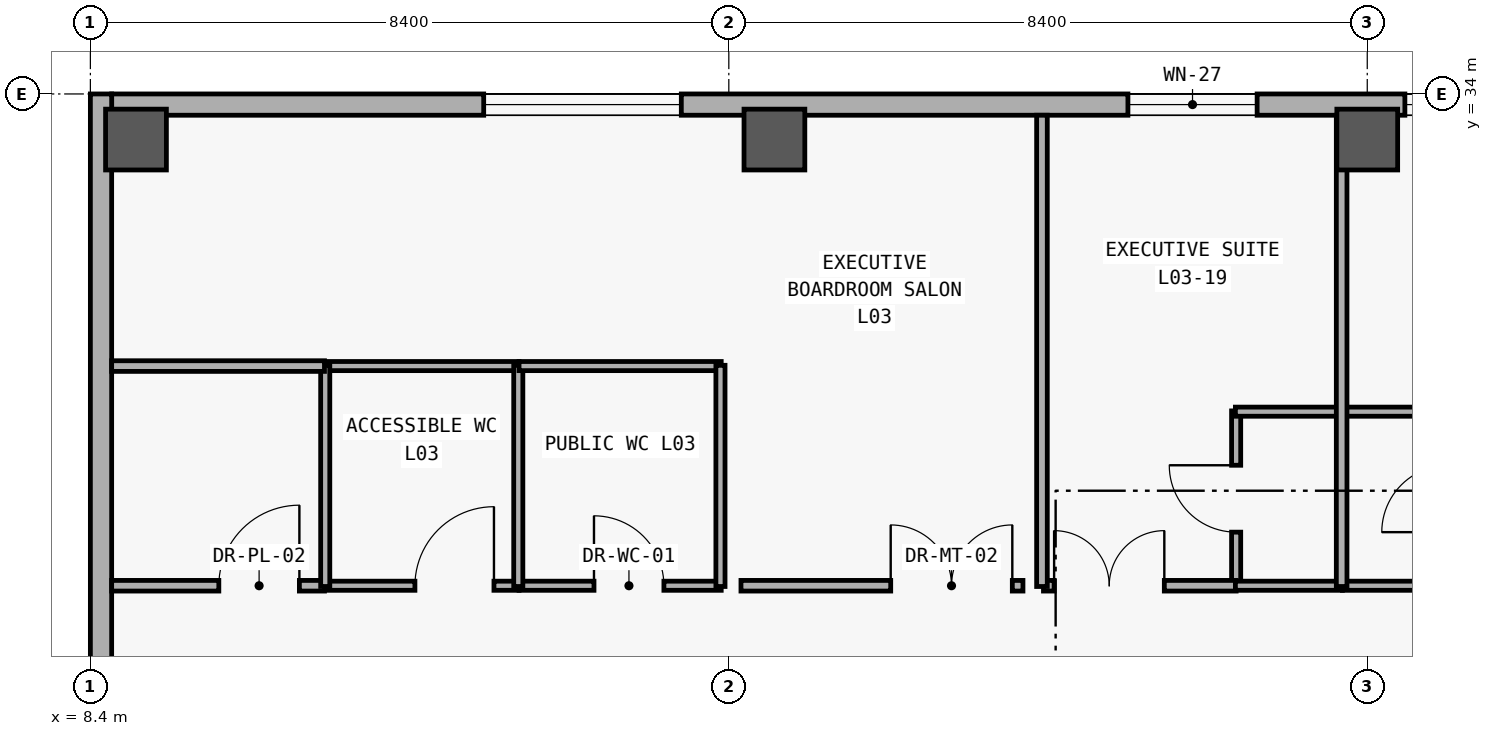
"""IFC4 building model, lengths in metres.
Left out: names, types, materials, properties, quantities, classifications, styles, units other than length and angle.
Written with IfcOpenShell. Run it as: python <this file> out.ifc"""

import sys

from ifc_helpers import new_model, si_unit, direction, frame, frame_2d, origin, origin_2d, place, context, subcontext, project, spatial, rectangle, extrude, element, fill, save


model = new_model("IFC4")
c1 = context("Model", 3, precision=1e-05, world=origin(), true_north=direction((0.0, 1.0)))
c2 = subcontext(c1, "Body", "Model", "MODEL_VIEW")
j1 = project(units=[si_unit("LENGTHUNIT", "METRE"), si_unit("PLANEANGLEUNIT", "RADIAN")], contexts=[c1])
p1 = place(None, origin())
s1 = spatial("IfcSite", under=j1, at=p1, CompositionType="ELEMENT")
p2 = place(p1, origin())
s2 = spatial("IfcBuilding", under=s1, at=p2, CompositionType="ELEMENT")
p3 = place(p2, frame((0.0, 0.0, 15.0)))
s3 = spatial("IfcBuildingStorey", under=s2, at=p3, CompositionType="ELEMENT", Elevation=15.0)
for number, where, z_axis, x_axis in (
    (1, (9.0, 33.4, 0.0), (0.0, 0.0, 1.0), (1.0, 0.0, 0.0)),
    (2, (17.4, 33.4, 0.0), (0.0, 0.0, 1.0), (1.0, 0.0, 0.0)),
    (3, (25.2, 33.4, 0.0), (0.0, 0.0, 1.0), (1.0, 0.0, 0.0)),
):
    element("IfcColumn", number, at=place(p3, frame(where, z_axis=z_axis, x_axis=x_axis)), inside=s3, PredefinedType="COLUMN", context=c2, shape_type="SweptSolid", body=[
        extrude(rectangle(XDim=0.8, YDim=0.8, at=origin_2d()), origin(), (0.0, 0.0, 1.0), 4.2),
    ])
p4 = place(p3, frame((8.68, 33.86, 0.0), z_axis=(0.0, 0.0, 1.0), x_axis=(1.0, 0.0, 0.0)))
e4 = element("IfcWall", 4, at=p4, inside=s3, PredefinedType="SOLIDWALL", context=c2, shape_type="SweptSolid", body=[
    extrude(rectangle(XDim=83.44, YDim=0.28, at=frame_2d((41.72, 0.0))), origin(), (0.0, 0.0, 1.0), 3.92),
])
p5 = place(p4, frame((4.895, 0.0, 0.85)))
e5 = element("IfcOpeningElement", 5, at=p5, cuts=e4, PredefinedType="OPENING", context=c2, shape_type="SweptSolid", body=[
    extrude(rectangle(XDim=2.6, YDim=2.2, at=frame_2d((1.3, 1.1))), frame((0.0, 0.15, 0.0), z_axis=(0.0, -1.0, 0.0), x_axis=(1.0, 0.0, 0.0)), (0.0, 0.0, 1.0), 0.3),
])
p6 = place(p4, frame((13.371, 0.0, 0.85)))
e6 = element("IfcOpeningElement", 6, at=p6, cuts=e4, PredefinedType="OPENING", context=c2, shape_type="SweptSolid", body=[
    extrude(rectangle(XDim=1.7, YDim=2.0, at=frame_2d((0.85, 1.0))), frame((0.0, 0.15, 0.0), z_axis=(0.0, -1.0, 0.0), x_axis=(1.0, 0.0, 0.0)), (0.0, 0.0, 1.0), 0.3),
])
p7 = place(p4, frame((17.015, 0.0, 0.85)))
e7 = element("IfcOpeningElement", 7, at=p7, cuts=e4, PredefinedType="OPENING", context=c2, shape_type="SweptSolid", body=[
    extrude(rectangle(XDim=2.3, YDim=2.05, at=frame_2d((1.15, 1.025))), frame((0.0, 0.15, 0.0), z_axis=(0.0, -1.0, 0.0), x_axis=(1.0, 0.0, 0.0)), (0.0, 0.0, 1.0), 0.3),
])
p8 = place(p4, frame((20.732, 0.0, 0.85)))
e8 = element("IfcOpeningElement", 8, at=p8, cuts=e4, PredefinedType="OPENING", context=c2, shape_type="SweptSolid", body=[
    extrude(rectangle(XDim=2.75, YDim=2.1, at=frame_2d((1.375, 1.05))), frame((0.0, 0.15, 0.0), z_axis=(0.0, -1.0, 0.0), x_axis=(1.0, 0.0, 0.0)), (0.0, 0.0, 1.0), 0.3),
])
p9 = place(p4, frame((25.46, 0.0, 0.85)))
e9 = element("IfcOpeningElement", 9, at=p9, cuts=e4, PredefinedType="OPENING", context=c2, shape_type="SweptSolid", body=[
    extrude(rectangle(XDim=1.18, YDim=1.5, at=frame_2d((0.59, 0.75))), frame((0.0, 0.15, 0.0), z_axis=(0.0, -1.0, 0.0), x_axis=(1.0, 0.0, 0.0)), (0.0, 0.0, 1.0), 0.3),
])
p10 = place(p4, frame((29.352, 0.0, 0.85)))
e10 = element("IfcOpeningElement", 10, at=p10, cuts=e4, PredefinedType="OPENING", context=c2, shape_type="SweptSolid", body=[
    extrude(rectangle(XDim=1.28, YDim=1.6, at=frame_2d((0.64, 0.8))), frame((0.0, 0.15, 0.0), z_axis=(0.0, -1.0, 0.0), x_axis=(1.0, 0.0, 0.0)), (0.0, 0.0, 1.0), 0.3),
])
p11 = place(p4, frame((33.245, 0.0, 0.85)))
e11 = element("IfcOpeningElement", 11, at=p11, cuts=e4, PredefinedType="OPENING", context=c2, shape_type="SweptSolid", body=[
    extrude(rectangle(XDim=1.38, YDim=1.7, at=frame_2d((0.69, 0.85))), frame((0.0, 0.15, 0.0), z_axis=(0.0, -1.0, 0.0), x_axis=(1.0, 0.0, 0.0)), (0.0, 0.0, 1.0), 0.3),
])
p12 = place(p4, frame((37.138, 0.0, 0.85)))
e12 = element("IfcOpeningElement", 12, at=p12, cuts=e4, PredefinedType="OPENING", context=c2, shape_type="SweptSolid", body=[
    extrude(rectangle(XDim=1.48, YDim=1.8, at=frame_2d((0.74, 0.9))), frame((0.0, 0.15, 0.0), z_axis=(0.0, -1.0, 0.0), x_axis=(1.0, 0.0, 0.0)), (0.0, 0.0, 1.0), 0.3),
])
p13 = place(p4, frame((41.031, 0.0, 0.85)))
e13 = element("IfcOpeningElement", 13, at=p13, cuts=e4, PredefinedType="OPENING", context=c2, shape_type="SweptSolid", body=[
    extrude(rectangle(XDim=1.58, YDim=1.85, at=frame_2d((0.79, 0.925))), frame((0.0, 0.15, 0.0), z_axis=(0.0, -1.0, 0.0), x_axis=(1.0, 0.0, 0.0)), (0.0, 0.0, 1.0), 0.3),
])
p14 = place(p4, frame((44.923, 0.0, 0.85)))
e14 = element("IfcOpeningElement", 14, at=p14, cuts=e4, PredefinedType="OPENING", context=c2, shape_type="SweptSolid", body=[
    extrude(rectangle(XDim=1.68, YDim=1.9, at=frame_2d((0.84, 0.95))), frame((0.0, 0.15, 0.0), z_axis=(0.0, -1.0, 0.0), x_axis=(1.0, 0.0, 0.0)), (0.0, 0.0, 1.0), 0.3),
])
p15 = place(p4, frame((48.816, 0.0, 0.85)))
e15 = element("IfcOpeningElement", 15, at=p15, cuts=e4, PredefinedType="OPENING", context=c2, shape_type="SweptSolid", body=[
    extrude(rectangle(XDim=1.78, YDim=1.95, at=frame_2d((0.89, 0.975))), frame((0.0, 0.15, 0.0), z_axis=(0.0, -1.0, 0.0), x_axis=(1.0, 0.0, 0.0)), (0.0, 0.0, 1.0), 0.3),
])
p16 = place(p4, frame((52.71, 0.0, 0.85)))
e16 = element("IfcOpeningElement", 16, at=p16, cuts=e4, PredefinedType="OPENING", context=c2, shape_type="SweptSolid", body=[
    extrude(rectangle(XDim=1.88, YDim=1.95, at=frame_2d((0.94, 0.975))), frame((0.0, 0.15, 0.0), z_axis=(0.0, -1.0, 0.0), x_axis=(1.0, 0.0, 0.0)), (0.0, 0.0, 1.0), 0.3),
])
p17 = place(p4, frame((56.567, 0.0, 0.85)))
e17 = element("IfcOpeningElement", 17, at=p17, cuts=e4, PredefinedType="OPENING", context=c2, shape_type="SweptSolid", body=[
    extrude(rectangle(XDim=2.05, YDim=1.95, at=frame_2d((1.025, 0.975))), frame((0.0, 0.15, 0.0), z_axis=(0.0, -1.0, 0.0), x_axis=(1.0, 0.0, 0.0)), (0.0, 0.0, 1.0), 0.3),
])
p18 = place(p4, frame((60.444, 0.0, 0.85)))
e18 = element("IfcOpeningElement", 18, at=p18, cuts=e4, PredefinedType="OPENING", context=c2, shape_type="SweptSolid", body=[
    extrude(rectangle(XDim=2.18, YDim=1.95, at=frame_2d((1.09, 0.975))), frame((0.0, 0.15, 0.0), z_axis=(0.0, -1.0, 0.0), x_axis=(1.0, 0.0, 0.0)), (0.0, 0.0, 1.0), 0.3),
])
p19 = place(p4, frame((64.287, 0.0, 0.85)))
e19 = element("IfcOpeningElement", 19, at=p19, cuts=e4, PredefinedType="OPENING", context=c2, shape_type="SweptSolid", body=[
    extrude(rectangle(XDim=2.38, YDim=1.95, at=frame_2d((1.19, 0.975))), frame((0.0, 0.15, 0.0), z_axis=(0.0, -1.0, 0.0), x_axis=(1.0, 0.0, 0.0)), (0.0, 0.0, 1.0), 0.3),
])
p20 = place(p4, frame((68.181, 0.0, 0.85)))
e20 = element("IfcOpeningElement", 20, at=p20, cuts=e4, PredefinedType="OPENING", context=c2, shape_type="SweptSolid", body=[
    extrude(rectangle(XDim=2.48, YDim=2.0, at=frame_2d((1.24, 1.0))), frame((0.0, 0.15, 0.0), z_axis=(0.0, -1.0, 0.0), x_axis=(1.0, 0.0, 0.0)), (0.0, 0.0, 1.0), 0.3),
])
p21 = place(p4, frame((72.038, 0.0, 0.85)))
e21 = element("IfcOpeningElement", 21, at=p21, cuts=e4, PredefinedType="OPENING", context=c2, shape_type="SweptSolid", body=[
    extrude(rectangle(XDim=2.65, YDim=2.0, at=frame_2d((1.325, 1.0))), frame((0.0, 0.15, 0.0), z_axis=(0.0, -1.0, 0.0), x_axis=(1.0, 0.0, 0.0)), (0.0, 0.0, 1.0), 0.3),
])
p22 = place(p4, frame((75.831, 0.0, 0.85)))
e22 = element("IfcOpeningElement", 22, at=p22, cuts=e4, PredefinedType="OPENING", context=c2, shape_type="SweptSolid", body=[
    extrude(rectangle(XDim=2.95, YDim=2.05, at=frame_2d((1.475, 1.025))), frame((0.0, 0.15, 0.0), z_axis=(0.0, -1.0, 0.0), x_axis=(1.0, 0.0, 0.0)), (0.0, 0.0, 1.0), 0.3),
])
p23 = place(p4, frame((80.349, 0.0, 0.85)))
e23 = element("IfcOpeningElement", 23, at=p23, cuts=e4, PredefinedType="OPENING", context=c2, shape_type="SweptSolid", body=[
    extrude(rectangle(XDim=1.8, YDim=1.8, at=frame_2d((0.9, 0.9))), frame((0.0, 0.15, 0.0), z_axis=(0.0, -1.0, 0.0), x_axis=(1.0, 0.0, 0.0)), (0.0, 0.0, 1.0), 0.3),
])
p24 = place(p3, frame((8.54, 6.0, 0.0), z_axis=(0.0, 0.0, 1.0), x_axis=(0.0, 1.0, 0.0)))
e24 = element("IfcWall", 24, at=p24, inside=s3, PredefinedType="SOLIDWALL", context=c2, shape_type="SweptSolid", body=[
    extrude(rectangle(XDim=28.0, YDim=0.28, at=frame_2d((14.0, 0.0))), origin(), (0.0, 0.0, 1.0), 3.92),
])
p25 = place(p24, frame((4.5, 0.0, 0.95)))
e25 = element("IfcOpeningElement", 25, at=p25, cuts=e24, PredefinedType="OPENING", context=c2, shape_type="SweptSolid", body=[
    extrude(rectangle(XDim=1.6, YDim=1.6, at=frame_2d((0.8, 0.8))), frame((0.0, 0.15, 0.0), z_axis=(0.0, -1.0, 0.0), x_axis=(1.0, 0.0, 0.0)), (0.0, 0.0, 1.0), 0.3),
])
p26 = place(p3, frame((23.475, 27.52, 0.0), z_axis=(0.0, 0.0, 1.0), x_axis=(0.0, 1.0, 0.0)))
e26 = element("IfcWall", 26, at=p26, inside=s3, PredefinedType="PARTITIONING", context=c2, shape_type="SweptSolid", body=[
    extrude(rectangle(XDim=2.31, YDim=0.12, at=frame_2d((1.155, 0.0))), origin(), (0.0, 0.0, 1.0), 3.02),
])
p27 = place(p26, frame((0.715, 0.0, 0.0)))
e27 = element("IfcOpeningElement", 27, at=p27, cuts=e26, PredefinedType="OPENING", context=c2, shape_type="SweptSolid", body=[
    extrude(rectangle(XDim=0.88, YDim=2.15, at=frame_2d((0.44, 1.075))), frame((0.0, 0.07, 0.0), z_axis=(0.0, -1.0, 0.0), x_axis=(1.0, 0.0, 0.0)), (0.0, 0.0, 1.0), 0.14),
])
p28 = place(p3, frame((11.48, 27.53, 0.0), z_axis=(0.0, 0.0, 1.0), x_axis=(1.0, 0.0, 0.0)))
e28 = element("IfcWall", 28, at=p28, inside=s3, PredefinedType="PARTITIONING", context=c2, shape_type="SweptSolid", body=[
    extrude(rectangle(XDim=2.56, YDim=0.12, at=frame_2d((1.28, 0.0))), origin(), (0.0, 0.0, 1.0), 3.02),
])
p29 = place(p28, frame((1.19, 0.0, 0.0)))
e29 = element("IfcOpeningElement", 29, at=p29, cuts=e28, PredefinedType="OPENING", context=c2, shape_type="SweptSolid", body=[
    extrude(rectangle(XDim=1.04, YDim=2.15, at=frame_2d((0.52, 1.075))), frame((0.0, 0.07, 0.0), z_axis=(0.0, -1.0, 0.0), x_axis=(1.0, 0.0, 0.0)), (0.0, 0.0, 1.0), 0.14),
])
p30 = place(p3, frame((14.04, 27.53, 0.0), z_axis=(0.0, 0.0, 1.0), x_axis=(1.0, 0.0, 0.0)))
e30 = element("IfcWall", 30, at=p30, inside=s3, PredefinedType="PARTITIONING", context=c2, shape_type="SweptSolid", body=[
    extrude(rectangle(XDim=2.66, YDim=0.12, at=frame_2d((1.33, 0.0))), origin(), (0.0, 0.0, 1.0), 3.02),
])
p31 = place(p30, frame((0.986, 0.0, 0.0)))
e31 = element("IfcOpeningElement", 31, at=p31, cuts=e30, PredefinedType="OPENING", context=c2, shape_type="SweptSolid", body=[
    extrude(rectangle(XDim=0.92, YDim=2.15, at=frame_2d((0.46, 1.075))), frame((0.0, 0.07, 0.0), z_axis=(0.0, -1.0, 0.0), x_axis=(1.0, 0.0, 0.0)), (0.0, 0.0, 1.0), 0.14),
])
p32 = place(p3, frame((8.68, 27.53, 0.0), z_axis=(0.0, 0.0, 1.0), x_axis=(1.0, 0.0, 0.0)))
e32 = element("IfcWall", 32, at=p32, inside=s3, PredefinedType="PARTITIONING", context=c2, shape_type="SweptSolid", body=[
    extrude(rectangle(XDim=2.8, YDim=0.14, at=frame_2d((1.4, 0.0))), origin(), (0.0, 0.0, 1.0), 3.02),
])
p33 = place(p32, frame((1.41, 0.0, 0.0)))
e33 = element("IfcOpeningElement", 33, at=p33, cuts=e32, PredefinedType="OPENING", context=c2, shape_type="SweptSolid", body=[
    extrude(rectangle(XDim=1.06, YDim=2.2, at=frame_2d((0.53, 1.1))), frame((0.0, 0.08, 0.0), z_axis=(0.0, -1.0, 0.0), x_axis=(1.0, 0.0, 0.0)), (0.0, 0.0, 1.0), 0.16),
])
p34 = place(p3, frame((16.96, 27.53, 0.0), z_axis=(0.0, 0.0, 1.0), x_axis=(1.0, 0.0, 0.0)))
e34 = element("IfcWall", 34, at=p34, inside=s3, PredefinedType="PARTITIONING", context=c2, shape_type="SweptSolid", body=[
    extrude(rectangle(XDim=3.71, YDim=0.14, at=frame_2d((1.855, 0.0))), origin(), (0.0, 0.0, 1.0), 3.02),
])
p35 = place(p34, frame((1.97, 0.0, 0.0)))
e35 = element("IfcOpeningElement", 35, at=p35, cuts=e34, PredefinedType="OPENING", context=c2, shape_type="SweptSolid", body=[
    extrude(rectangle(XDim=1.6, YDim=2.3, at=frame_2d((0.8, 1.15))), frame((0.0, 0.08, 0.0), z_axis=(0.0, -1.0, 0.0), x_axis=(1.0, 0.0, 0.0)), (0.0, 0.0, 1.0), 0.16),
])
p36 = place(p3, frame((20.94, 27.53, 0.0), z_axis=(0.0, 0.0, 1.0), x_axis=(1.0, 0.0, 0.0)))
e36 = element("IfcWall", 36, at=p36, inside=s3, PredefinedType="PARTITIONING", context=c2, shape_type="SweptSolid", body=[
    extrude(rectangle(XDim=2.535, YDim=0.14, at=frame_2d((1.268, 0.0))), origin(), (0.0, 0.0, 1.0), 3.02),
])
p37 = place(p36, frame((0.14, 0.0, 0.0)))
e37 = element("IfcOpeningElement", 37, at=p37, cuts=e36, PredefinedType="OPENING", context=c2, shape_type="SweptSolid", body=[
    extrude(rectangle(XDim=1.45, YDim=2.3, at=frame_2d((0.725, 1.15))), frame((0.0, 0.08, 0.0), z_axis=(0.0, -1.0, 0.0), x_axis=(1.0, 0.0, 0.0)), (0.0, 0.0, 1.0), 0.16),
])
for number, where, z_axis, x_axis in (
    (38, (23.465, 27.53, 0.0), (0.0, 0.0, 1.0), (1.0, 0.0, 0.0)),
    (39, (23.465, 29.82, 0.0), (0.0, 0.0, 1.0), (1.0, 0.0, 0.0)),
    (40, (24.873, 27.53, 0.0), (0.0, 0.0, 1.0), (1.0, 0.0, 0.0)),
    (41, (24.873, 29.82, 0.0), (0.0, 0.0, 1.0), (1.0, 0.0, 0.0)),
):
    element("IfcWall", number, at=place(p3, frame(where, z_axis=z_axis, x_axis=x_axis)), inside=s3, PredefinedType="PARTITIONING", context=c2, shape_type="SweptSolid", body=[
        extrude(rectangle(XDim=1.408, YDim=0.12, at=frame_2d((0.704, 0.0))), origin(), (0.0, 0.0, 1.0), 3.02),
    ])
p38 = place(p3, frame((11.48, 30.42, 0.0), z_axis=(0.0, 0.0, 1.0), x_axis=(1.0, 0.0, 0.0)))
e42 = element("IfcWall", 42, at=p38, inside=s3, PredefinedType="PARTITIONING", context=c2, shape_type="SweptSolid", body=[
    extrude(rectangle(XDim=2.56, YDim=0.12, at=frame_2d((1.28, 0.0))), origin(), (0.0, 0.0, 1.0), 3.02),
])
for number, where, z_axis, x_axis in (
    (43, (11.49, 27.52, 0.0), (0.0, 0.0, 1.0), (0.0, 1.0, 0.0)),
    (44, (14.03, 27.52, 0.0), (0.0, 0.0, 1.0), (0.0, 1.0, 0.0)),
):
    element("IfcWall", number, at=place(p3, frame(where, z_axis=z_axis, x_axis=x_axis)), inside=s3, PredefinedType="PARTITIONING", context=c2, shape_type="SweptSolid", body=[
        extrude(rectangle(XDim=2.91, YDim=0.12, at=frame_2d((1.455, 0.0))), origin(), (0.0, 0.0, 1.0), 3.02),
    ])
p39 = place(p3, frame((14.04, 30.42, 0.0), z_axis=(0.0, 0.0, 1.0), x_axis=(1.0, 0.0, 0.0)))
e45 = element("IfcWall", 45, at=p39, inside=s3, PredefinedType="PARTITIONING", context=c2, shape_type="SweptSolid", body=[
    extrude(rectangle(XDim=2.66, YDim=0.12, at=frame_2d((1.33, 0.0))), origin(), (0.0, 0.0, 1.0), 3.02),
])
p40 = place(p3, frame((16.69, 27.52, 0.0), z_axis=(0.0, 0.0, 1.0), x_axis=(0.0, 1.0, 0.0)))
e46 = element("IfcWall", 46, at=p40, inside=s3, PredefinedType="PARTITIONING", context=c2, shape_type="SweptSolid", body=[
    extrude(rectangle(XDim=2.91, YDim=0.12, at=frame_2d((1.455, 0.0))), origin(), (0.0, 0.0, 1.0), 3.02),
])
p41 = place(p3, frame((8.68, 30.42, 0.0), z_axis=(0.0, 0.0, 1.0), x_axis=(1.0, 0.0, 0.0)))
e47 = element("IfcWall", 47, at=p41, inside=s3, PredefinedType="PARTITIONING", context=c2, shape_type="SweptSolid", body=[
    extrude(rectangle(XDim=2.8, YDim=0.14, at=frame_2d((1.4, 0.0))), origin(), (0.0, 0.0, 1.0), 3.02),
])
for number, where, z_axis, x_axis in (
    (48, (20.92, 27.52, 0.0), (0.0, 0.0, 1.0), (0.0, 1.0, 0.0)),
    (49, (24.863, 27.52, 0.0), (0.0, 0.0, 1.0), (0.0, 1.0, 0.0)),
):
    element("IfcWall", number, at=place(p3, frame(where, z_axis=z_axis, x_axis=x_axis)), inside=s3, PredefinedType="PARTITIONING", context=c2, shape_type="SweptSolid", body=[
        extrude(rectangle(XDim=6.2, YDim=0.14, at=frame_2d((3.1, 0.0))), origin(), (0.0, 0.0, 1.0), 3.02),
    ])
p42 = place(p5, origin())
e50 = element("IfcWindow", 50, at=p42, inside=s3, PartitioningType="SINGLE_PANEL", PredefinedType="WINDOW", context=c2, shape_type="SweptSolid", body=[
    extrude(rectangle(XDim=2.6, YDim=2.2, at=frame_2d((1.3, 1.1))), frame((0.0, 0.03, 0.0), z_axis=(0.0, -1.0, 0.0), x_axis=(1.0, 0.0, 0.0)), (0.0, 0.0, 1.0), 0.06),
])
fill(e5, e50)
p43 = place(p6, origin())
e51 = element("IfcWindow", 51, at=p43, inside=s3, PartitioningType="SINGLE_PANEL", PredefinedType="WINDOW", context=c2, shape_type="SweptSolid", body=[
    extrude(rectangle(XDim=1.7, YDim=2.0, at=frame_2d((0.85, 1.0))), frame((0.0, 0.03, 0.0), z_axis=(0.0, -1.0, 0.0), x_axis=(1.0, 0.0, 0.0)), (0.0, 0.0, 1.0), 0.06),
])
fill(e6, e51)
p44 = place(p7, origin())
e52 = element("IfcWindow", 52, at=p44, inside=s3, PartitioningType="SINGLE_PANEL", PredefinedType="WINDOW", context=c2, shape_type="SweptSolid", body=[
    extrude(rectangle(XDim=2.3, YDim=2.05, at=frame_2d((1.15, 1.025))), frame((0.0, 0.03, 0.0), z_axis=(0.0, -1.0, 0.0), x_axis=(1.0, 0.0, 0.0)), (0.0, 0.0, 1.0), 0.06),
])
fill(e7, e52)
p45 = place(p27, origin())
e53 = element("IfcDoor", 53, at=p45, inside=s3, OperationType="SINGLE_SWING_RIGHT", PredefinedType="DOOR", context=c2, shape_type="SweptSolid", body=[
    extrude(rectangle(XDim=0.88, YDim=2.15, at=frame_2d((0.44, 1.075))), frame((0.0, 0.025, 0.0), z_axis=(0.0, -1.0, 0.0), x_axis=(1.0, 0.0, 0.0)), (0.0, 0.0, 1.0), 0.05),
])
fill(e27, e53)
p46 = place(p29, origin())
e54 = element("IfcDoor", 54, at=p46, inside=s3, OperationType="SINGLE_SWING_RIGHT", PredefinedType="DOOR", context=c2, shape_type="SweptSolid", body=[
    extrude(rectangle(XDim=1.04, YDim=2.15, at=frame_2d((0.52, 1.075))), frame((0.0, 0.025, 0.0), z_axis=(0.0, -1.0, 0.0), x_axis=(1.0, 0.0, 0.0)), (0.0, 0.0, 1.0), 0.05),
])
fill(e29, e54)
p47 = place(p31, origin())
e55 = element("IfcDoor", 55, at=p47, inside=s3, OperationType="SINGLE_SWING_LEFT", PredefinedType="DOOR", context=c2, shape_type="SweptSolid", body=[
    extrude(rectangle(XDim=0.92, YDim=2.15, at=frame_2d((0.46, 1.075))), frame((0.0, 0.025, 0.0), z_axis=(0.0, -1.0, 0.0), x_axis=(1.0, 0.0, 0.0)), (0.0, 0.0, 1.0), 0.05),
])
fill(e31, e55)
p48 = place(p33, origin())
e56 = element("IfcDoor", 56, at=p48, inside=s3, OperationType="SINGLE_SWING_RIGHT", PredefinedType="DOOR", context=c2, shape_type="SweptSolid", body=[
    extrude(rectangle(XDim=1.06, YDim=2.2, at=frame_2d((0.53, 1.1))), frame((0.0, 0.025, 0.0), z_axis=(0.0, -1.0, 0.0), x_axis=(1.0, 0.0, 0.0)), (0.0, 0.0, 1.0), 0.05),
])
fill(e33, e56)
p49 = place(p35, origin())
e57 = element("IfcDoor", 57, at=p49, inside=s3, OperationType="DOUBLE_DOOR_SINGLE_SWING", PredefinedType="DOOR", context=c2, shape_type="SweptSolid", body=[
    extrude(rectangle(XDim=1.6, YDim=2.3, at=frame_2d((0.8, 1.15))), frame((0.0, 0.025, 0.0), z_axis=(0.0, -1.0, 0.0), x_axis=(1.0, 0.0, 0.0)), (0.0, 0.0, 1.0), 0.05),
])
fill(e35, e57)
p50 = place(p37, origin())
e58 = element("IfcDoor", 58, at=p50, inside=s3, OperationType="DOUBLE_DOOR_SINGLE_SWING", PredefinedType="DOOR", context=c2, shape_type="SweptSolid", body=[
    extrude(rectangle(XDim=1.45, YDim=2.3, at=frame_2d((0.725, 1.15))), frame((0.0, 0.025, 0.0), z_axis=(0.0, -1.0, 0.0), x_axis=(1.0, 0.0, 0.0)), (0.0, 0.0, 1.0), 0.05),
])
fill(e37, e58)
save(model, sys.argv[1])
